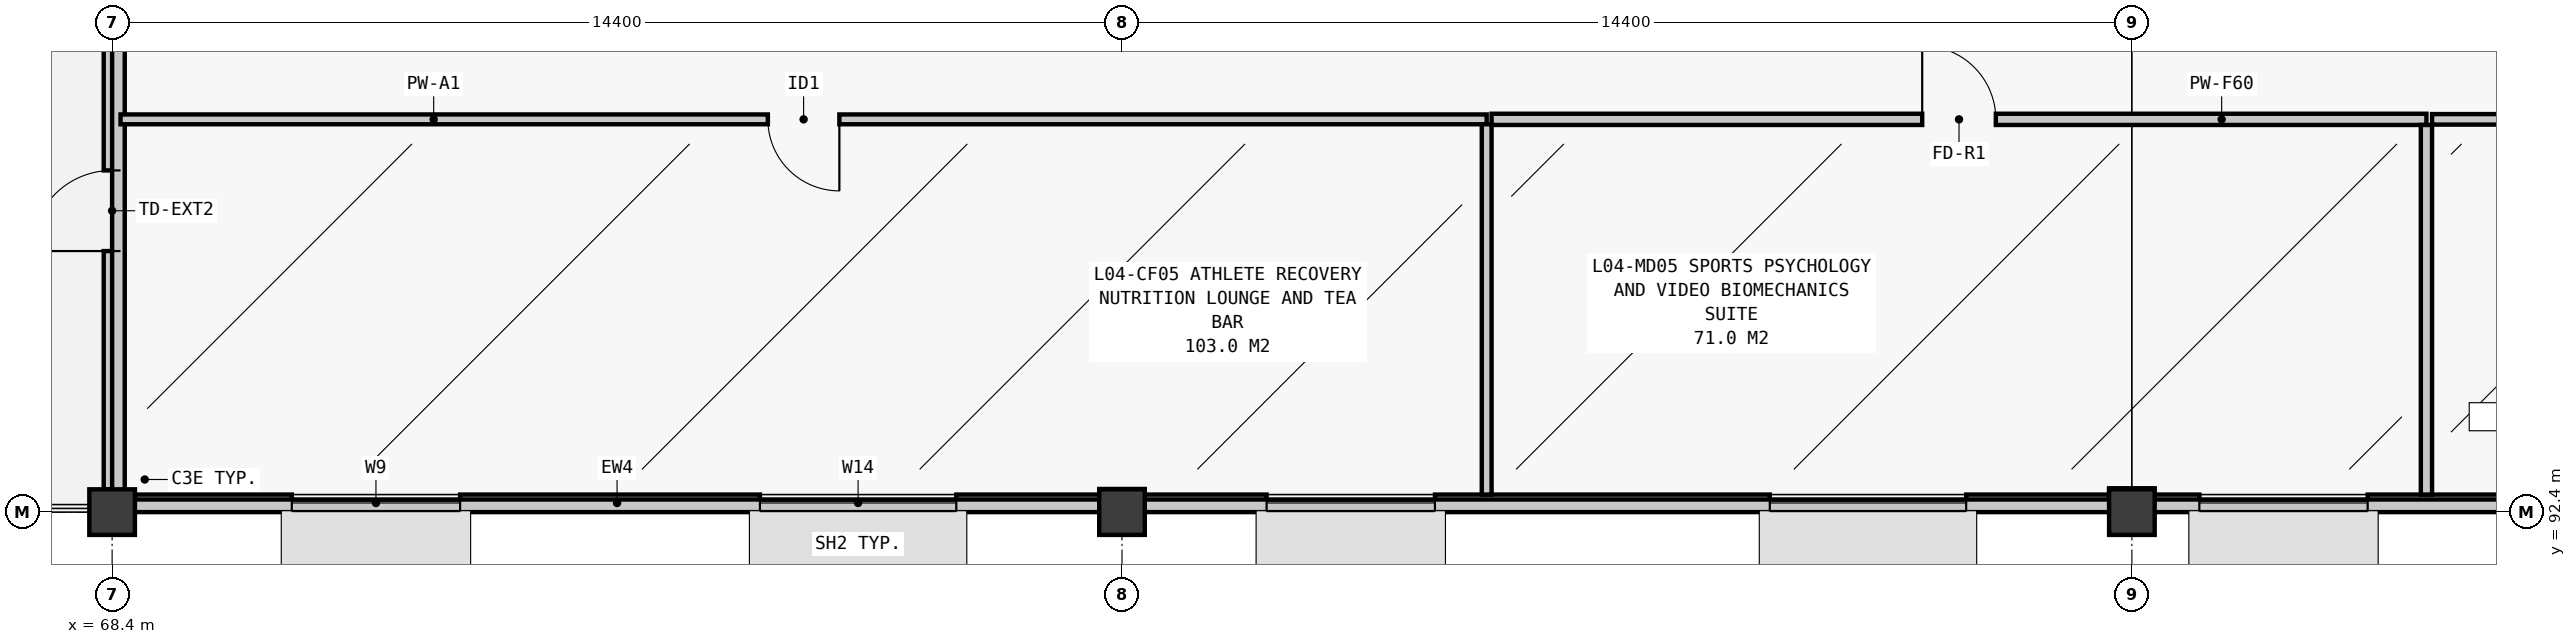
"""IFC4 building model, lengths in metres.
Left out: names, types, materials, properties, quantities, classifications, styles, units other than length and angle.
Written with IfcOpenShell. Run it as: python <this file> out.ifc"""

import sys

from ifc_helpers import new_model, si_unit, direction, frame, frame_2d, origin, origin_2d, place, context, subcontext, project, spatial, rectangle, extrude, element, fill, save


model = new_model("IFC4")
c1 = context("Model", 3, precision=1e-05, world=origin(), true_north=direction((0.0, 1.0)))
c2 = subcontext(c1, "Body", "Model", "MODEL_VIEW")
j1 = project(units=[si_unit("LENGTHUNIT", "METRE"), si_unit("PLANEANGLEUNIT", "RADIAN")], contexts=[c1])
p1 = place(None, origin())
s1 = spatial("IfcSite", under=j1, at=p1, CompositionType="ELEMENT")
p2 = place(p1, origin())
s2 = spatial("IfcBuilding", under=s1, at=p2, CompositionType="ELEMENT")
p3 = place(p2, frame((0.0, 0.0, 17.4)))
s3 = spatial("IfcBuildingStorey", under=s2, at=p3, CompositionType="ELEMENT", Elevation=17.4)
for number, where, z_axis, x_axis in (
    (1, (68.4, 92.4, 0.0), (0.0, 0.0, 1.0), (1.0, 0.0, 0.0)),
    (2, (82.8, 92.4, 0.0), (0.0, 0.0, 1.0), (1.0, 0.0, 0.0)),
    (3, (97.2, 92.4, 0.0), (0.0, 0.0, 1.0), (1.0, 0.0, 0.0)),
):
    element("IfcColumn", number, at=place(p3, frame(where, z_axis=z_axis, x_axis=x_axis)), inside=s3, PredefinedType="COLUMN", context=c2, shape_type="SweptSolid", body=[
        extrude(rectangle(XDim=0.65, YDim=0.65, at=origin_2d()), origin(), (0.0, 0.0, 1.0), 4.15),
    ])
p4 = place(p3, frame((68.4, 100.67, 0.0), z_axis=(0.0, 0.0, 1.0), x_axis=(0.0, -1.0, 0.0)))
e4 = element("IfcWall", 4, at=p4, inside=s3, PredefinedType="STANDARD", context=c2, shape_type="SweptSolid", body=[
    extrude(rectangle(XDim=7.945, YDim=0.24, at=frame_2d((3.972, 0.0))), origin(), (0.0, 0.0, 1.0), 3.437),
])
p5 = place(p4, frame((3.398, 0.0, 0.0)))
e5 = element("IfcOpeningElement", 5, at=p5, cuts=e4, PredefinedType="OPENING", context=c2, shape_type="SweptSolid", body=[
    extrude(rectangle(XDim=1.15, YDim=2.25, at=frame_2d((0.575, 1.125))), frame((0.0, 0.135, 0.0), z_axis=(0.0, -1.0, 0.0), x_axis=(1.0, 0.0, 0.0)), (0.0, 0.0, 1.0), 0.27),
])
p6 = place(p3, frame((68.725, 92.53, 0.0), z_axis=(0.0, 0.0, 1.0), x_axis=(1.0, 0.0, 0.0)))
e6 = element("IfcWall", 6, at=p6, inside=s3, PredefinedType="STANDARD", context=c2, shape_type="SweptSolid", body=[
    extrude(rectangle(XDim=13.75, YDim=0.24, at=frame_2d((6.875, 0.0))), origin(), (0.0, 0.0, 1.0), 3.214),
])
p7 = place(p6, frame((2.237, 0.0, 1.2)))
e7 = element("IfcOpeningElement", 7, at=p7, cuts=e6, PredefinedType="OPENING", context=c2, shape_type="SweptSolid", body=[
    extrude(rectangle(XDim=2.4, YDim=1.35, at=frame_2d((1.2, 0.675))), frame((0.0, 0.135, 0.0), z_axis=(0.0, -1.0, 0.0), x_axis=(1.0, 0.0, 0.0)), (0.0, 0.0, 1.0), 0.27),
])
p8 = place(p6, frame((8.912, 0.0, 0.9)))
e8 = element("IfcOpeningElement", 8, at=p8, cuts=e6, PredefinedType="OPENING", context=c2, shape_type="SweptSolid", body=[
    extrude(rectangle(XDim=2.8, YDim=1.8, at=frame_2d((1.4, 0.9))), frame((0.0, 0.135, 0.0), z_axis=(0.0, -1.0, 0.0), x_axis=(1.0, 0.0, 0.0)), (0.0, 0.0, 1.0), 0.27),
])
p9 = place(p3, frame((83.125, 92.53, 0.0), z_axis=(0.0, 0.0, 1.0), x_axis=(1.0, 0.0, 0.0)))
e9 = element("IfcWall", 9, at=p9, inside=s3, PredefinedType="STANDARD", context=c2, shape_type="SweptSolid", body=[
    extrude(rectangle(XDim=13.75, YDim=0.24, at=frame_2d((6.875, 0.0))), origin(), (0.0, 0.0, 1.0), 3.214),
])
p10 = place(p9, frame((1.737, 0.0, 1.2)))
e10 = element("IfcOpeningElement", 10, at=p10, cuts=e9, PredefinedType="OPENING", context=c2, shape_type="SweptSolid", body=[
    extrude(rectangle(XDim=2.4, YDim=1.35, at=frame_2d((1.2, 0.675))), frame((0.0, 0.135, 0.0), z_axis=(0.0, -1.0, 0.0), x_axis=(1.0, 0.0, 0.0)), (0.0, 0.0, 1.0), 0.27),
])
p11 = place(p9, frame((8.912, 0.0, 0.9)))
e11 = element("IfcOpeningElement", 11, at=p11, cuts=e9, PredefinedType="OPENING", context=c2, shape_type="SweptSolid", body=[
    extrude(rectangle(XDim=2.8, YDim=1.8, at=frame_2d((1.4, 0.9))), frame((0.0, 0.135, 0.0), z_axis=(0.0, -1.0, 0.0), x_axis=(1.0, 0.0, 0.0)), (0.0, 0.0, 1.0), 0.27),
])
p12 = place(p3, frame((97.525, 92.53, 0.0), z_axis=(0.0, 0.0, 1.0), x_axis=(1.0, 0.0, 0.0)))
e12 = element("IfcWall", 12, at=p12, inside=s3, PredefinedType="STANDARD", context=c2, shape_type="SweptSolid", body=[
    extrude(rectangle(XDim=13.75, YDim=0.24, at=frame_2d((6.875, 0.0))), origin(), (0.0, 0.0, 1.0), 3.214),
])
p13 = place(p12, frame((0.637, 0.0, 1.2)))
e13 = element("IfcOpeningElement", 13, at=p13, cuts=e12, PredefinedType="OPENING", context=c2, shape_type="SweptSolid", body=[
    extrude(rectangle(XDim=2.4, YDim=1.35, at=frame_2d((1.2, 0.675))), frame((0.0, 0.135, 0.0), z_axis=(0.0, -1.0, 0.0), x_axis=(1.0, 0.0, 0.0)), (0.0, 0.0, 1.0), 0.27),
])
p14 = place(p12, frame((8.912, 0.0, 0.9)))
e14 = element("IfcOpeningElement", 14, at=p14, cuts=e12, PredefinedType="OPENING", context=c2, shape_type="SweptSolid", body=[
    extrude(rectangle(XDim=2.8, YDim=1.8, at=frame_2d((1.4, 0.9))), frame((0.0, 0.135, 0.0), z_axis=(0.0, -1.0, 0.0), x_axis=(1.0, 0.0, 0.0)), (0.0, 0.0, 1.0), 0.27),
])
p15 = place(p3, frame((68.49, 92.4, 4.2), z_axis=(0.0, 0.0, 1.0), x_axis=(0.0, 1.0, 0.0)))
e15 = element("IfcWall", 15, at=p15, inside=s3, PredefinedType="PARAPET", context=c2, shape_type="SweptSolid", body=[
    extrude(rectangle(XDim=25.2, YDim=0.18, at=frame_2d((12.6, 0.0))), origin(), (0.0, 0.0, 1.0), 0.95),
])
p16 = place(p3, frame((68.4, 92.49, 4.2), z_axis=(0.0, 0.0, 1.0), x_axis=(1.0, 0.0, 0.0)))
e16 = element("IfcWall", 16, at=p16, inside=s3, PredefinedType="PARAPET", context=c2, shape_type="SweptSolid", body=[
    extrude(rectangle(XDim=57.6, YDim=0.18, at=frame_2d((28.8, 0.0))), origin(), (0.0, 0.0, 1.0), 0.95),
])
p17 = place(p3, frame((68.52, 98.0, 0.0), z_axis=(0.0, 0.0, 1.0), x_axis=(1.0, 0.0, 0.0)))
e17 = element("IfcWall", 17, at=p17, inside=s3, PredefinedType="PARTITIONING", context=c2, shape_type="SweptSolid", body=[
    extrude(rectangle(XDim=19.48, YDim=0.14, at=frame_2d((9.74, 0.0))), origin(), (0.0, 0.0, 1.0), 3.98),
])
p18 = place(p17, frame((9.23, 0.0, 0.0)))
e18 = element("IfcOpeningElement", 18, at=p18, cuts=e17, PredefinedType="OPENING", context=c2, shape_type="SweptSolid", body=[
    extrude(rectangle(XDim=1.02, YDim=2.15, at=frame_2d((0.51, 1.075))), frame((0.0, 0.085, 0.0), z_axis=(0.0, -1.0, 0.0), x_axis=(1.0, 0.0, 0.0)), (0.0, 0.0, 1.0), 0.17),
])
p19 = place(p3, frame((82.475, 92.66, 0.0), z_axis=(0.0, 0.0, 1.0), x_axis=(1.0, 0.0, 0.0)))
e19 = element("IfcWall", 19, at=p19, inside=s3, PredefinedType="PARTITIONING", context=c2, shape_type="SweptSolid", body=[
    extrude(rectangle(XDim=0.65, YDim=0.14, at=frame_2d((0.325, 0.0))), origin(), (0.0, 0.0, 1.0), 3.98),
])
p20 = place(p3, frame((88.0, 92.65, 0.0), z_axis=(0.0, 0.0, 1.0), x_axis=(0.0, 1.0, 0.0)))
e20 = element("IfcWall", 20, at=p20, inside=s3, PredefinedType="PARTITIONING", context=c2, shape_type="SweptSolid", body=[
    extrude(rectangle(XDim=5.28, YDim=0.14, at=frame_2d((2.64, 0.0))), origin(), (0.0, 0.0, 1.0), 3.98),
])
p21 = place(p3, frame((88.07, 98.0, 0.0), z_axis=(0.0, 0.0, 1.0), x_axis=(1.0, 0.0, 0.0)))
e21 = element("IfcWall", 21, at=p21, inside=s3, PredefinedType="PARTITIONING", context=c2, shape_type="SweptSolid", body=[
    extrude(rectangle(XDim=13.33, YDim=0.16, at=frame_2d((6.665, 0.0))), origin(), (0.0, 0.0, 1.0), 3.98),
])
p22 = place(p21, frame((6.14, 0.0, 0.0)))
e22 = element("IfcOpeningElement", 22, at=p22, cuts=e21, PredefinedType="OPENING", context=c2, shape_type="SweptSolid", body=[
    extrude(rectangle(XDim=1.05, YDim=2.18, at=frame_2d((0.525, 1.09))), frame((0.0, 0.095, 0.0), z_axis=(0.0, -1.0, 0.0), x_axis=(1.0, 0.0, 0.0)), (0.0, 0.0, 1.0), 0.19),
])
p23 = place(p3, frame((96.875, 92.66, 0.0), z_axis=(0.0, 0.0, 1.0), x_axis=(1.0, 0.0, 0.0)))
e23 = element("IfcWall", 23, at=p23, inside=s3, PredefinedType="PARTITIONING", context=c2, shape_type="SweptSolid", body=[
    extrude(rectangle(XDim=0.65, YDim=0.16, at=frame_2d((0.325, 0.0))), origin(), (0.0, 0.0, 1.0), 3.98),
])
p24 = place(p3, frame((101.4, 92.65, 0.0), z_axis=(0.0, 0.0, 1.0), x_axis=(0.0, 1.0, 0.0)))
e24 = element("IfcWall", 24, at=p24, inside=s3, PredefinedType="PARTITIONING", context=c2, shape_type="SweptSolid", body=[
    extrude(rectangle(XDim=5.27, YDim=0.16, at=frame_2d((2.635, 0.0))), origin(), (0.0, 0.0, 1.0), 3.98),
])
p25 = place(p3, frame((101.48, 98.0, 0.0), z_axis=(0.0, 0.0, 1.0), x_axis=(1.0, 0.0, 0.0)))
e25 = element("IfcWall", 25, at=p25, inside=s3, PredefinedType="PLUMBINGWALL", context=c2, shape_type="SweptSolid", body=[
    extrude(rectangle(XDim=12.12, YDim=0.15, at=frame_2d((6.06, 0.0))), origin(), (0.0, 0.0, 1.0), 3.98),
])
p26 = place(p25, frame((5.585, 0.0, 0.0)))
e26 = element("IfcOpeningElement", 26, at=p26, cuts=e25, PredefinedType="OPENING", context=c2, shape_type="SweptSolid", body=[
    extrude(rectangle(XDim=0.95, YDim=2.1, at=frame_2d((0.475, 1.05))), frame((0.0, 0.09, 0.0), z_axis=(0.0, -1.0, 0.0), x_axis=(1.0, 0.0, 0.0)), (0.0, 0.0, 1.0), 0.18),
])
p27 = place(p5, frame((1.15, 0.0, 0.0), z_axis=(0.0, 0.0, 1.0), x_axis=(-1.0, 0.0, 0.0)))
e27 = element("IfcDoor", 27, at=p27, inside=s3, OperationType="SINGLE_SWING_RIGHT", PredefinedType="DOOR", context=c2, shape_type="SweptSolid", body=[
    extrude(rectangle(XDim=1.15, YDim=2.25, at=frame_2d((0.575, 1.125))), frame((0.0, 0.025, 0.0), z_axis=(0.0, -1.0, 0.0), x_axis=(1.0, 0.0, 0.0)), (0.0, 0.0, 1.0), 0.05),
])
fill(e5, e27)
p28 = place(p7, origin())
e28 = element("IfcWindow", 28, at=p28, inside=s3, PartitioningType="SINGLE_PANEL", PredefinedType="WINDOW", context=c2, shape_type="SweptSolid", body=[
    extrude(rectangle(XDim=2.4, YDim=1.35, at=frame_2d((1.2, 0.675))), frame((0.0, 0.03, 0.0), z_axis=(0.0, -1.0, 0.0), x_axis=(1.0, 0.0, 0.0)), (0.0, 0.0, 1.0), 0.06),
])
fill(e7, e28)
p29 = place(p8, origin())
e29 = element("IfcWindow", 29, at=p29, inside=s3, PartitioningType="SINGLE_PANEL", PredefinedType="WINDOW", context=c2, shape_type="SweptSolid", body=[
    extrude(rectangle(XDim=2.8, YDim=1.8, at=frame_2d((1.4, 0.9))), frame((0.0, 0.03, 0.0), z_axis=(0.0, -1.0, 0.0), x_axis=(1.0, 0.0, 0.0)), (0.0, 0.0, 1.0), 0.06),
])
fill(e8, e29)
p30 = place(p10, origin())
e30 = element("IfcWindow", 30, at=p30, inside=s3, PartitioningType="SINGLE_PANEL", PredefinedType="WINDOW", context=c2, shape_type="SweptSolid", body=[
    extrude(rectangle(XDim=2.4, YDim=1.35, at=frame_2d((1.2, 0.675))), frame((0.0, 0.03, 0.0), z_axis=(0.0, -1.0, 0.0), x_axis=(1.0, 0.0, 0.0)), (0.0, 0.0, 1.0), 0.06),
])
fill(e10, e30)
p31 = place(p11, origin())
e31 = element("IfcWindow", 31, at=p31, inside=s3, PartitioningType="SINGLE_PANEL", PredefinedType="WINDOW", context=c2, shape_type="SweptSolid", body=[
    extrude(rectangle(XDim=2.8, YDim=1.8, at=frame_2d((1.4, 0.9))), frame((0.0, 0.03, 0.0), z_axis=(0.0, -1.0, 0.0), x_axis=(1.0, 0.0, 0.0)), (0.0, 0.0, 1.0), 0.06),
])
fill(e11, e31)
p32 = place(p13, origin())
e32 = element("IfcWindow", 32, at=p32, inside=s3, PartitioningType="SINGLE_PANEL", PredefinedType="WINDOW", context=c2, shape_type="SweptSolid", body=[
    extrude(rectangle(XDim=2.4, YDim=1.35, at=frame_2d((1.2, 0.675))), frame((0.0, 0.03, 0.0), z_axis=(0.0, -1.0, 0.0), x_axis=(1.0, 0.0, 0.0)), (0.0, 0.0, 1.0), 0.06),
])
fill(e13, e32)
p33 = place(p18, frame((1.02, 0.0, 0.0), z_axis=(0.0, 0.0, 1.0), x_axis=(-1.0, 0.0, 0.0)))
e33 = element("IfcDoor", 33, at=p33, inside=s3, OperationType="SINGLE_SWING_RIGHT", PredefinedType="DOOR", context=c2, shape_type="SweptSolid", body=[
    extrude(rectangle(XDim=1.02, YDim=2.15, at=frame_2d((0.51, 1.075))), frame((0.0, 0.025, 0.0), z_axis=(0.0, -1.0, 0.0), x_axis=(1.0, 0.0, 0.0)), (0.0, 0.0, 1.0), 0.05),
])
fill(e18, e33)
p34 = place(p22, origin())
e34 = element("IfcDoor", 34, at=p34, inside=s3, OperationType="SINGLE_SWING_LEFT", PredefinedType="DOOR", context=c2, shape_type="SweptSolid", body=[
    extrude(rectangle(XDim=1.05, YDim=2.18, at=frame_2d((0.525, 1.09))), frame((0.0, 0.025, 0.0), z_axis=(0.0, -1.0, 0.0), x_axis=(1.0, 0.0, 0.0)), (0.0, 0.0, 1.0), 0.05),
])
fill(e22, e34)
save(model, sys.argv[1])
